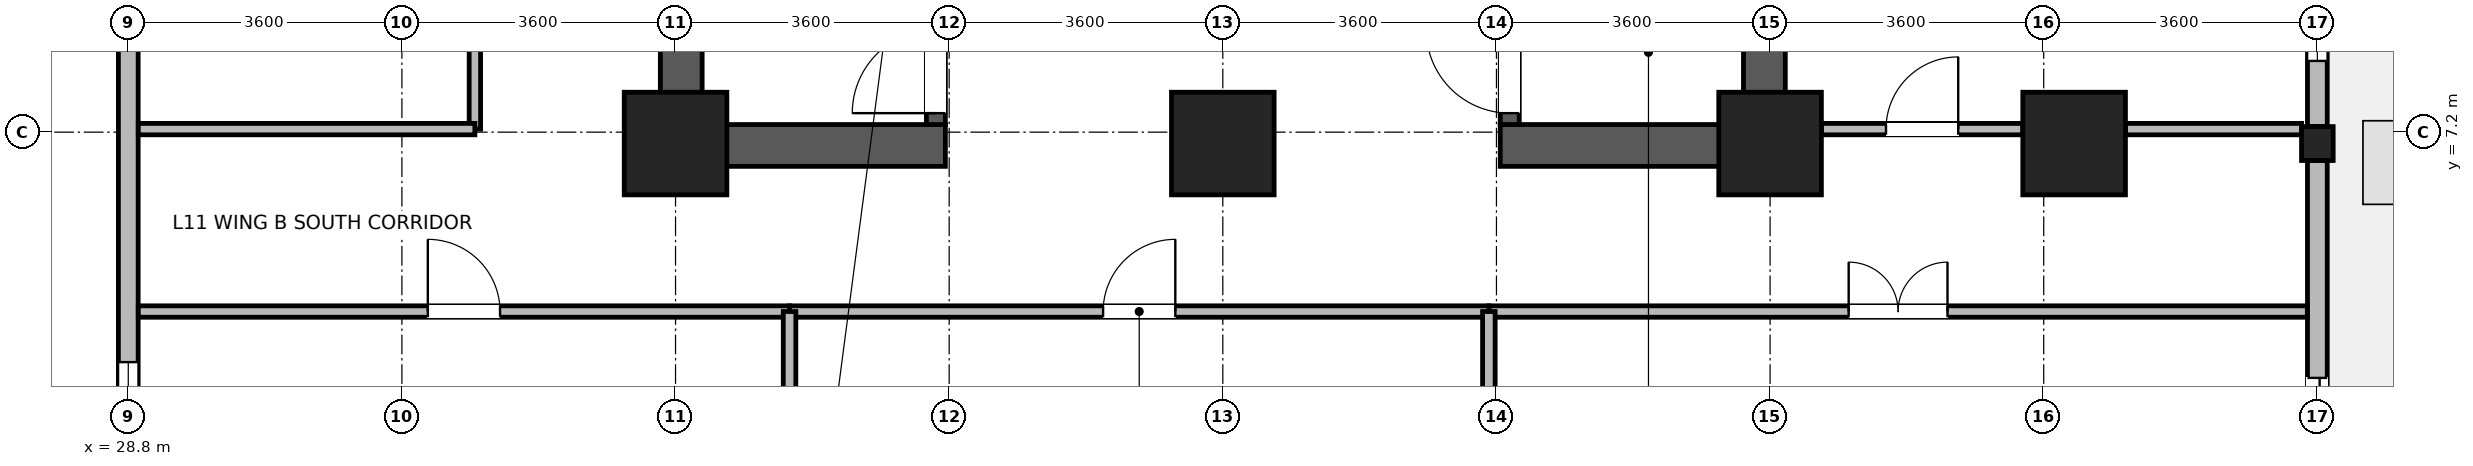
"""IFC4 building model, lengths in metres.
Left out: names, types, materials, properties, quantities, classifications, styles, units other than length and angle.
Written with IfcOpenShell. Run it as: python <this file> out.ifc"""

import sys

from ifc_helpers import new_model, si_unit, direction, frame, frame_2d, origin, origin_2d, place, context, subcontext, project, spatial, rectangle, i_section, extrude, source, transform, mapped, element, fill, save


model = new_model("IFC4")
c1 = context("Model", 3, precision=1e-05, world=origin(), true_north=direction((0.0, 1.0)))
c2 = subcontext(c1, "Body", "Model", "MODEL_VIEW")
j1 = project(units=[si_unit("LENGTHUNIT", "METRE"), si_unit("PLANEANGLEUNIT", "RADIAN")], contexts=[c1])
p1 = place(None, origin())
s1 = spatial("IfcSite", under=j1, at=p1, CompositionType="ELEMENT")
p2 = place(p1, origin())
s2 = spatial("IfcBuilding", under=s1, at=p2, CompositionType="ELEMENT")
p3 = place(p2, frame((0.0, 0.0, 47.5)))
s3 = spatial("IfcBuildingStorey", under=s2, at=p3, CompositionType="ELEMENT", Elevation=47.5)
for number, where, z_axis, x_axis in (
    (1, (36.075, 6.75, 0.0), (0.0, 0.0, 1.0), (0.0, 1.0, 0.0)),
    (2, (50.325, 6.75, 0.0), (0.0, 0.0, 1.0), (0.0, 1.0, 0.0)),
):
    element("IfcWall", number, at=place(p3, frame(where, z_axis=z_axis, x_axis=x_axis)), inside=s3, PredefinedType="SHEAR", context=c2, shape_type="SweptSolid", body=[
        extrude(rectangle(XDim=8.1, YDim=0.55, at=frame_2d((4.05, 0.0))), origin(), (0.0, 0.0, 1.0), 3.45),
    ])
for number, where, z_axis, x_axis in (
    (3, (36.35, 7.025, 0.0), (0.0, 0.0, 1.0), (1.0, 0.0, 0.0)),
    (4, (46.85, 7.025, 0.0), (0.0, 0.0, 1.0), (1.0, 0.0, 0.0)),
):
    element("IfcWall", number, at=place(p3, frame(where, z_axis=z_axis, x_axis=x_axis)), inside=s3, PredefinedType="SHEAR", context=c2, shape_type="SweptSolid", body=[
        extrude(rectangle(XDim=3.2, YDim=0.55, at=frame_2d((1.6, 0.0))), origin(), (0.0, 0.0, 1.0), 3.45),
    ])
p4 = place(p3, frame((39.425, 7.3, 0.0), z_axis=(0.0, 0.0, 1.0), x_axis=(0.0, 1.0, 0.0)))
e5 = element("IfcWall", 5, at=p4, inside=s3, PredefinedType="SHEAR", context=c2, shape_type="SweptSolid", body=[
    extrude(rectangle(XDim=7.0, YDim=0.25, at=frame_2d((3.5, 0.0))), origin(), (0.0, 0.0, 1.0), 3.45),
])
p5 = place(p4, frame((0.15, 0.0, 0.0)))
e6 = element("IfcOpeningElement", 6, at=p5, cuts=e5, PredefinedType="OPENING", context=c2, shape_type="SweptSolid", body=[
    extrude(rectangle(XDim=1.1, YDim=2.08, at=frame_2d((0.55, 1.04))), frame((0.0, 0.135, 0.0), z_axis=(0.0, -1.0, 0.0), x_axis=(1.0, 0.0, 0.0)), (0.0, 0.0, 1.0), 0.27),
])
p6 = place(p3, frame((46.975, 7.3, 0.0), z_axis=(0.0, 0.0, 1.0), x_axis=(0.0, 1.0, 0.0)))
e7 = element("IfcWall", 7, at=p6, inside=s3, PredefinedType="SHEAR", context=c2, shape_type="SweptSolid", body=[
    extrude(rectangle(XDim=7.0, YDim=0.25, at=frame_2d((3.5, 0.0))), origin(), (0.0, 0.0, 1.0), 3.45),
])
p7 = place(p6, frame((0.15, 0.0, 0.0)))
e8 = element("IfcOpeningElement", 8, at=p7, cuts=e7, PredefinedType="OPENING", context=c2, shape_type="SweptSolid", body=[
    extrude(rectangle(XDim=1.1, YDim=2.08, at=frame_2d((0.55, 1.04))), frame((0.0, 0.135, 0.0), z_axis=(0.0, -1.0, 0.0), x_axis=(1.0, 0.0, 0.0)), (0.0, 0.0, 1.0), 0.27),
])
m1 = source(origin(), c2, "Body", "SweptSolid", [
    extrude(rectangle(XDim=1.35, YDim=1.35, at=origin_2d()), origin(), (0.0, 0.0, 1.0), 3.7),
])
for number, where, z_axis, x_axis in (
    (9, (36.0, 7.05, 0.0), (0.0, 0.0, 1.0), (1.0, 0.0, 0.0)),
    (10, (43.2, 7.05, 0.0), (0.0, 0.0, 1.0), (1.0, 0.0, 0.0)),
    (11, (50.4, 7.05, 0.0), (0.0, 0.0, 1.0), (1.0, 0.0, 0.0)),
    (12, (54.4, 7.05, 0.0), (0.0, 0.0, 1.0), (1.0, 0.0, 0.0)),
):
    element("IfcColumn", number, at=place(p3, frame(where, z_axis=z_axis, x_axis=x_axis)), inside=s3, PredefinedType="COLUMN", context=c2, shape_type="MappedRepresentation", body=[
        mapped(m1, transform((0.0, 0.0, 0.0), x_axis=(1.0, 0.0, 0.0), y_axis=(0.0, 1.0, 0.0), z_axis=(0.0, 0.0, 1.0), scale=1.0)),
    ])
m2 = source(origin(), c2, "Body", "SweptSolid", [
    extrude(i_section(OverallWidth=0.416, OverallDepth=0.446, WebThickness=0.029, FlangeThickness=0.04, FilletRadius=0.015, at=origin_2d()), origin(), (0.0, 0.0, 1.0), 3.7),
])
p8 = place(p3, frame((57.6, 7.05, 0.0), z_axis=(0.0, 0.0, 1.0), x_axis=(1.0, 0.0, 0.0)))
e13 = element("IfcColumn", 13, at=p8, inside=s3, PredefinedType="COLUMN", context=c2, shape_type="MappedRepresentation", body=[
    mapped(m2, transform((0.0, 0.0, 0.0), x_axis=(1.0, 0.0, 0.0), y_axis=(0.0, 1.0, 0.0), z_axis=(0.0, 0.0, 1.0), scale=1.0)),
])
p9 = place(p3, frame((57.6, 6.826, 0.0), z_axis=(0.0, 0.0, 1.0), x_axis=(0.0, -1.0, 0.0)))
e14 = element("IfcWall", 14, at=p9, inside=s3, PredefinedType="STANDARD", context=c2, shape_type="SweptSolid", body=[
    extrude(rectangle(XDim=5.156, YDim=0.26, at=frame_2d((2.578, 0.0))), origin(), (0.0, 0.0, 1.0), 3.43),
])
p10 = place(p9, frame((2.859, 0.0, 0.0)))
e15 = element("IfcOpeningElement", 15, at=p10, cuts=e14, PredefinedType="OPENING", context=c2, shape_type="SweptSolid", body=[
    extrude(rectangle(XDim=1.5, YDim=2.15, at=frame_2d((0.75, 1.075))), frame((0.0, 0.14, 0.0), z_axis=(0.0, -1.0, 0.0), x_axis=(1.0, 0.0, 0.0)), (0.0, 0.0, 1.0), 0.28),
])
p11 = place(p3, frame((57.6, 14.326, 0.0), z_axis=(0.0, 0.0, 1.0), x_axis=(0.0, -1.0, 0.0)))
e16 = element("IfcWall", 16, at=p11, inside=s3, PredefinedType="STANDARD", context=c2, shape_type="SweptSolid", body=[
    extrude(rectangle(XDim=7.052, YDim=0.26, at=frame_2d((3.526, 0.0))), origin(), (0.0, 0.0, 1.0), 2.93),
])
p12 = place(p11, frame((0.863, 0.0, 0.85)))
e17 = element("IfcOpeningElement", 17, at=p12, cuts=e16, PredefinedType="OPENING", context=c2, shape_type="SweptSolid", body=[
    extrude(rectangle(XDim=1.8, YDim=1.85, at=frame_2d((0.9, 0.925))), frame((0.0, 0.14, 0.0), z_axis=(0.0, -1.0, 0.0), x_axis=(1.0, 0.0, 0.0)), (0.0, 0.0, 1.0), 0.28),
])
p13 = place(p11, frame((4.389, 0.0, 0.85)))
e18 = element("IfcOpeningElement", 18, at=p13, cuts=e16, PredefinedType="OPENING", context=c2, shape_type="SweptSolid", body=[
    extrude(rectangle(XDim=1.8, YDim=1.85, at=frame_2d((0.9, 0.925))), frame((0.0, 0.14, 0.0), z_axis=(0.0, -1.0, 0.0), x_axis=(1.0, 0.0, 0.0)), (0.0, 0.0, 1.0), 0.28),
])
p14 = place(p3, frame((28.8, 1.67, 0.0), z_axis=(0.0, 0.0, 1.0), x_axis=(0.0, 1.0, 0.0)))
e19 = element("IfcWall", 19, at=p14, inside=s3, PredefinedType="STANDARD", context=c2, shape_type="SweptSolid", body=[
    extrude(rectangle(XDim=19.254, YDim=0.26, at=frame_2d((9.627, 0.0))), origin(), (0.0, 0.0, 1.0), 3.43),
])
p15 = place(p14, frame((0.705, 0.0, 0.85)))
e20 = element("IfcOpeningElement", 20, at=p15, cuts=e19, PredefinedType="OPENING", context=c2, shape_type="SweptSolid", body=[
    extrude(rectangle(XDim=1.8, YDim=1.85, at=frame_2d((0.9, 0.925))), frame((0.0, 0.14, 0.0), z_axis=(0.0, -1.0, 0.0), x_axis=(1.0, 0.0, 0.0)), (0.0, 0.0, 1.0), 0.28),
])
p16 = place(p14, frame((7.123, 0.0, 0.85)))
e21 = element("IfcOpeningElement", 21, at=p16, cuts=e19, PredefinedType="OPENING", context=c2, shape_type="SweptSolid", body=[
    extrude(rectangle(XDim=1.8, YDim=1.85, at=frame_2d((0.9, 0.925))), frame((0.0, 0.14, 0.0), z_axis=(0.0, -1.0, 0.0), x_axis=(1.0, 0.0, 0.0)), (0.0, 0.0, 1.0), 0.28),
])
p17 = place(p14, frame((10.332, 0.0, 0.85)))
e22 = element("IfcOpeningElement", 22, at=p17, cuts=e19, PredefinedType="OPENING", context=c2, shape_type="SweptSolid", body=[
    extrude(rectangle(XDim=1.8, YDim=1.85, at=frame_2d((0.9, 0.925))), frame((0.0, 0.14, 0.0), z_axis=(0.0, -1.0, 0.0), x_axis=(1.0, 0.0, 0.0)), (0.0, 0.0, 1.0), 0.28),
])
p18 = place(p14, frame((13.541, 0.0, 0.85)))
e23 = element("IfcOpeningElement", 23, at=p18, cuts=e19, PredefinedType="OPENING", context=c2, shape_type="SweptSolid", body=[
    extrude(rectangle(XDim=1.8, YDim=1.85, at=frame_2d((0.9, 0.925))), frame((0.0, 0.14, 0.0), z_axis=(0.0, -1.0, 0.0), x_axis=(1.0, 0.0, 0.0)), (0.0, 0.0, 1.0), 0.28),
])
p19 = place(p14, frame((16.75, 0.0, 0.85)))
e24 = element("IfcOpeningElement", 24, at=p19, cuts=e19, PredefinedType="OPENING", context=c2, shape_type="SweptSolid", body=[
    extrude(rectangle(XDim=1.8, YDim=1.85, at=frame_2d((0.9, 0.925))), frame((0.0, 0.14, 0.0), z_axis=(0.0, -1.0, 0.0), x_axis=(1.0, 0.0, 0.0)), (0.0, 0.0, 1.0), 0.28),
])
p20 = place(p3, frame((46.7, 4.84, 0.0), z_axis=(0.0, 0.0, 1.0), x_axis=(1.0, 0.0, 0.0)))
e25 = element("IfcWall", 25, at=p20, inside=s3, PredefinedType="PARTITIONING", context=c2, shape_type="SweptSolid", body=[
    extrude(rectangle(XDim=10.768, YDim=0.15, at=frame_2d((5.384, 0.0))), origin(), (0.0, 0.0, 1.0), 3.43),
])
p21 = place(p20, frame((4.734, 0.0, 0.0)))
e26 = element("IfcOpeningElement", 26, at=p21, cuts=e25, PredefinedType="OPENING", context=c2, shape_type="SweptSolid", body=[
    extrude(rectangle(XDim=1.3, YDim=2.12, at=frame_2d((0.65, 1.06))), frame((0.0, 0.085, 0.0), z_axis=(0.0, -1.0, 0.0), x_axis=(1.0, 0.0, 0.0)), (0.0, 0.0, 1.0), 0.17),
])
p22 = place(p3, frame((37.5, 4.84, 0.0), z_axis=(0.0, 0.0, 1.0), x_axis=(1.0, 0.0, 0.0)))
e27 = element("IfcWall", 27, at=p22, inside=s3, PredefinedType="PARTITIONING", context=c2, shape_type="SweptSolid", body=[
    extrude(rectangle(XDim=9.2, YDim=0.15, at=frame_2d((4.6, 0.0))), origin(), (0.0, 0.0, 1.0), 3.43),
])
p23 = place(p22, frame((4.125, 0.0, 0.0)))
e28 = element("IfcOpeningElement", 28, at=p23, cuts=e27, PredefinedType="OPENING", context=c2, shape_type="SweptSolid", body=[
    extrude(rectangle(XDim=0.95, YDim=2.1, at=frame_2d((0.475, 1.05))), frame((0.0, 0.085, 0.0), z_axis=(0.0, -1.0, 0.0), x_axis=(1.0, 0.0, 0.0)), (0.0, 0.0, 1.0), 0.17),
])
p24 = place(p3, frame((28.932, 4.84, 0.0), z_axis=(0.0, 0.0, 1.0), x_axis=(1.0, 0.0, 0.0)))
e29 = element("IfcWall", 29, at=p24, inside=s3, PredefinedType="PARTITIONING", context=c2, shape_type="SweptSolid", body=[
    extrude(rectangle(XDim=8.568, YDim=0.15, at=frame_2d((4.284, 0.0))), origin(), (0.0, 0.0, 1.0), 3.43),
])
p25 = place(p24, frame((3.809, 0.0, 0.0)))
e30 = element("IfcOpeningElement", 30, at=p25, cuts=e29, PredefinedType="OPENING", context=c2, shape_type="SweptSolid", body=[
    extrude(rectangle(XDim=0.95, YDim=2.1, at=frame_2d((0.475, 1.05))), frame((0.0, 0.085, 0.0), z_axis=(0.0, -1.0, 0.0), x_axis=(1.0, 0.0, 0.0)), (0.0, 0.0, 1.0), 0.17),
])
p26 = place(p3, frame((33.36, 7.24, 0.0), z_axis=(0.0, 0.0, 1.0), x_axis=(0.0, 1.0, 0.0)))
e31 = element("IfcWall", 31, at=p26, inside=s3, PredefinedType="PARTITIONING", context=c2, shape_type="SweptSolid", body=[
    extrude(rectangle(XDim=7.26, YDim=0.15, at=frame_2d((3.63, 0.0))), origin(), (0.0, 0.0, 1.0), 3.43),
])
p27 = place(p26, frame((2.98, 0.0, 0.0)))
e32 = element("IfcOpeningElement", 32, at=p27, cuts=e31, PredefinedType="OPENING", context=c2, shape_type="SweptSolid", body=[
    extrude(rectangle(XDim=1.3, YDim=2.12, at=frame_2d((0.65, 1.06))), frame((0.0, 0.085, 0.0), z_axis=(0.0, -1.0, 0.0), x_axis=(1.0, 0.0, 0.0)), (0.0, 0.0, 1.0), 0.17),
])
p28 = place(p3, frame((51.075, 7.24, 0.0), z_axis=(0.0, 0.0, 1.0), x_axis=(1.0, 0.0, 0.0)))
e33 = element("IfcWall", 33, at=p28, inside=s3, PredefinedType="PARTITIONING", context=c2, shape_type="SweptSolid", body=[
    extrude(rectangle(XDim=2.65, YDim=0.15, at=frame_2d((1.325, 0.0))), origin(), (0.0, 0.0, 1.0), 2.78),
])
p29 = place(p28, frame((0.85, 0.0, 0.0)))
e34 = element("IfcOpeningElement", 34, at=p29, cuts=e33, PredefinedType="OPENING", context=c2, shape_type="SweptSolid", body=[
    extrude(rectangle(XDim=0.95, YDim=2.1, at=frame_2d((0.475, 1.05))), frame((0.0, 0.085, 0.0), z_axis=(0.0, -1.0, 0.0), x_axis=(1.0, 0.0, 0.0)), (0.0, 0.0, 1.0), 0.17),
])
p30 = place(p3, frame((55.075, 7.24, 0.0), z_axis=(0.0, 0.0, 1.0), x_axis=(1.0, 0.0, 0.0)))
e35 = element("IfcWall", 35, at=p30, inside=s3, PredefinedType="PARTITIONING", context=c2, shape_type="SweptSolid", body=[
    extrude(rectangle(XDim=2.317, YDim=0.15, at=frame_2d((1.159, 0.0))), origin(), (0.0, 0.0, 1.0), 2.78),
])
p31 = place(p3, frame((28.932, 7.24, 0.0), z_axis=(0.0, 0.0, 1.0), x_axis=(1.0, 0.0, 0.0)))
e36 = element("IfcWall", 36, at=p31, inside=s3, PredefinedType="PARTITIONING", context=c2, shape_type="SweptSolid", body=[
    extrude(rectangle(XDim=4.428, YDim=0.15, at=frame_2d((2.214, 0.0))), origin(), (0.0, 0.0, 1.0), 3.43),
])
for number, where, z_axis, x_axis in (
    (37, (37.5, 1.932, 0.0), (0.0, 0.0, 1.0), (0.0, 1.0, 0.0)),
    (38, (46.7, 1.932, 0.0), (0.0, 0.0, 1.0), (0.0, 1.0, 0.0)),
):
    element("IfcWall", number, at=place(p3, frame(where, z_axis=z_axis, x_axis=x_axis)), inside=s3, PredefinedType="PARTITIONING", context=c2, shape_type="SweptSolid", body=[
        extrude(rectangle(XDim=2.908, YDim=0.165, at=frame_2d((1.454, 0.0))), origin(), (0.0, 0.0, 1.0), 3.43),
    ])
p32 = place(p10, origin())
e39 = element("IfcDoor", 39, at=p32, inside=s3, OperationType="SLIDING_TO_LEFT", PredefinedType="DOOR", context=c2, shape_type="SweptSolid", body=[
    extrude(rectangle(XDim=1.5, YDim=2.15, at=frame_2d((0.75, 1.075))), frame((0.0, 0.025, 0.0), z_axis=(0.0, -1.0, 0.0), x_axis=(1.0, 0.0, 0.0)), (0.0, 0.0, 1.0), 0.05),
])
fill(e15, e39)
p33 = place(p13, origin())
e40 = element("IfcWindow", 40, at=p33, inside=s3, PartitioningType="SINGLE_PANEL", PredefinedType="WINDOW", context=c2, shape_type="SweptSolid", body=[
    extrude(rectangle(XDim=1.8, YDim=1.85, at=frame_2d((0.9, 0.925))), frame((0.0, 0.03, 0.0), z_axis=(0.0, -1.0, 0.0), x_axis=(1.0, 0.0, 0.0)), (0.0, 0.0, 1.0), 0.06),
])
fill(e18, e40)
p34 = place(p15, origin())
e41 = element("IfcWindow", 41, at=p34, inside=s3, PartitioningType="SINGLE_PANEL", PredefinedType="WINDOW", context=c2, shape_type="SweptSolid", body=[
    extrude(rectangle(XDim=1.8, YDim=1.85, at=frame_2d((0.9, 0.925))), frame((0.0, 0.03, 0.0), z_axis=(0.0, -1.0, 0.0), x_axis=(1.0, 0.0, 0.0)), (0.0, 0.0, 1.0), 0.06),
])
fill(e20, e41)
p35 = place(p5, origin())
e42 = element("IfcDoor", 42, at=p35, inside=s3, OperationType="SINGLE_SWING_LEFT", PredefinedType="DOOR", context=c2, shape_type="SweptSolid", body=[
    extrude(rectangle(XDim=1.1, YDim=2.08, at=frame_2d((0.55, 1.04))), frame((0.0, 0.025, 0.0), z_axis=(0.0, -1.0, 0.0), x_axis=(1.0, 0.0, 0.0)), (0.0, 0.0, 1.0), 0.05),
])
fill(e6, e42)
p36 = place(p7, origin())
e43 = element("IfcDoor", 43, at=p36, inside=s3, OperationType="SINGLE_SWING_RIGHT", PredefinedType="DOOR", context=c2, shape_type="SweptSolid", body=[
    extrude(rectangle(XDim=1.1, YDim=2.08, at=frame_2d((0.55, 1.04))), frame((0.0, 0.025, 0.0), z_axis=(0.0, -1.0, 0.0), x_axis=(1.0, 0.0, 0.0)), (0.0, 0.0, 1.0), 0.05),
])
fill(e8, e43)
p37 = place(p21, origin())
e44 = element("IfcDoor", 44, at=p37, inside=s3, OperationType="DOUBLE_DOOR_SINGLE_SWING", PredefinedType="DOOR", context=c2, shape_type="SweptSolid", body=[
    extrude(rectangle(XDim=1.3, YDim=2.12, at=frame_2d((0.65, 1.06))), frame((0.0, 0.025, 0.0), z_axis=(0.0, -1.0, 0.0), x_axis=(1.0, 0.0, 0.0)), (0.0, 0.0, 1.0), 0.05),
])
fill(e26, e44)
p38 = place(p23, origin())
e45 = element("IfcDoor", 45, at=p38, inside=s3, OperationType="SINGLE_SWING_RIGHT", PredefinedType="DOOR", context=c2, shape_type="SweptSolid", body=[
    extrude(rectangle(XDim=0.95, YDim=2.1, at=frame_2d((0.475, 1.05))), frame((0.0, 0.025, 0.0), z_axis=(0.0, -1.0, 0.0), x_axis=(1.0, 0.0, 0.0)), (0.0, 0.0, 1.0), 0.05),
])
fill(e28, e45)
p39 = place(p25, origin())
e46 = element("IfcDoor", 46, at=p39, inside=s3, OperationType="SINGLE_SWING_LEFT", PredefinedType="DOOR", context=c2, shape_type="SweptSolid", body=[
    extrude(rectangle(XDim=0.95, YDim=2.1, at=frame_2d((0.475, 1.05))), frame((0.0, 0.025, 0.0), z_axis=(0.0, -1.0, 0.0), x_axis=(1.0, 0.0, 0.0)), (0.0, 0.0, 1.0), 0.05),
])
fill(e30, e46)
p40 = place(p29, origin())
e47 = element("IfcDoor", 47, at=p40, inside=s3, OperationType="SINGLE_SWING_RIGHT", PredefinedType="DOOR", context=c2, shape_type="SweptSolid", body=[
    extrude(rectangle(XDim=0.95, YDim=2.1, at=frame_2d((0.475, 1.05))), frame((0.0, 0.025, 0.0), z_axis=(0.0, -1.0, 0.0), x_axis=(1.0, 0.0, 0.0)), (0.0, 0.0, 1.0), 0.05),
])
fill(e34, e47)
save(model, sys.argv[1])
